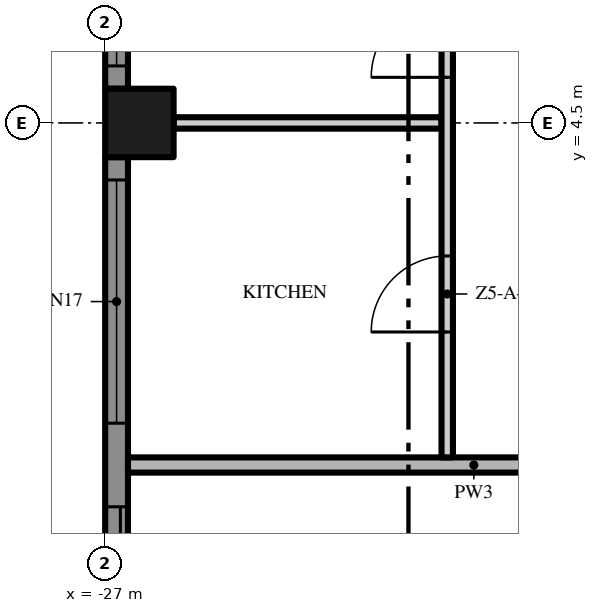
"""IFC4 building model, lengths in metres.
Left out: names, types, materials, properties, quantities, classifications, styles, units other than length and angle.
Written with IfcOpenShell. Run it as: python <this file> out.ifc"""

import sys

from ifc_helpers import new_model, si_unit, direction, frame, frame_2d, origin, origin_2d, place, context, subcontext, project, spatial, polyline, rectangle, outline, extrude, element, fill, save


model = new_model("IFC4")
c1 = context("Model", 3, precision=1e-05, world=origin(), true_north=direction((0.0, 1.0)))
c2 = subcontext(c1, "Body", "Model", "MODEL_VIEW")
j1 = project(units=[si_unit("LENGTHUNIT", "METRE"), si_unit("PLANEANGLEUNIT", "RADIAN")], contexts=[c1])
p1 = place(None, origin())
s1 = spatial("IfcSite", under=j1, at=p1, CompositionType="ELEMENT")
p2 = place(p1, origin())
s2 = spatial("IfcBuilding", under=s1, at=p2, CompositionType="ELEMENT")
p3 = place(p2, frame((0.0, 0.0, 242.6)))
s3 = spatial("IfcBuildingStorey", under=s2, at=p3, CompositionType="ELEMENT", Elevation=242.6)
p4 = place(p3, frame((-26.55, 4.5, 0.0), z_axis=(0.0, 0.0, 1.0), x_axis=(1.0, 0.0, 0.0)))
e1 = element("IfcColumn", 1, at=p4, inside=s3, PredefinedType="COLUMN", context=c2, shape_type="SweptSolid", body=[
    extrude(rectangle(XDim=0.9, YDim=0.9, at=origin_2d()), origin(), (0.0, 0.0, 1.0), 3.5),
])
p5 = place(p3, frame((-26.85, 4.95, 0.0), z_axis=(0.0, 0.0, 1.0), x_axis=(0.0, 1.0, 0.0)))
e2 = element("IfcWall", 2, at=p5, inside=s3, PredefinedType="SOLIDWALL", context=c2, shape_type="SweptSolid", body=[
    extrude(rectangle(XDim=8.1, YDim=0.3, at=frame_2d((4.05, 0.0))), origin(), (0.0, 0.0, 1.0), 3.5),
])
p6 = place(p5, frame((4.6, 0.0, 0.45)))
e3 = element("IfcOpeningElement", 3, at=p6, cuts=e2, PredefinedType="OPENING", context=c2, shape_type="SweptSolid", body=[
    extrude(rectangle(XDim=3.2, YDim=2.65, at=frame_2d((1.6, 1.325))), frame((0.0, 0.16, 0.0), z_axis=(0.0, -1.0, 0.0), x_axis=(1.0, 0.0, 0.0)), (0.0, 0.0, 1.0), 0.32),
])
p7 = place(p5, frame((0.3, 0.0, 0.45)))
e4 = element("IfcOpeningElement", 4, at=p7, cuts=e2, PredefinedType="OPENING", context=c2, shape_type="SweptSolid", body=[
    extrude(rectangle(XDim=3.2, YDim=2.65, at=frame_2d((1.6, 1.325))), frame((0.0, 0.16, 0.0), z_axis=(0.0, -1.0, 0.0), x_axis=(1.0, 0.0, 0.0)), (0.0, 0.0, 1.0), 0.32),
])
p8 = place(p3, frame((-26.85, -4.05, 0.0), z_axis=(0.0, 0.0, 1.0), x_axis=(0.0, 1.0, 0.0)))
e5 = element("IfcWall", 5, at=p8, inside=s3, PredefinedType="SOLIDWALL", context=c2, shape_type="SweptSolid", body=[
    extrude(rectangle(XDim=8.1, YDim=0.3, at=frame_2d((4.05, 0.0))), origin(), (0.0, 0.0, 1.0), 3.5),
])
p9 = place(p8, frame((4.6, 0.0, 0.45)))
e6 = element("IfcOpeningElement", 6, at=p9, cuts=e5, PredefinedType="OPENING", context=c2, shape_type="SweptSolid", body=[
    extrude(rectangle(XDim=3.2, YDim=2.65, at=frame_2d((1.6, 1.325))), frame((0.0, 0.16, 0.0), z_axis=(0.0, -1.0, 0.0), x_axis=(1.0, 0.0, 0.0)), (0.0, 0.0, 1.0), 0.32),
])
p10 = place(p8, frame((0.3, 0.0, 0.0)))
e7 = element("IfcOpeningElement", 7, at=p10, cuts=e5, PredefinedType="OPENING", context=c2, shape_type="SweptSolid", body=[
    extrude(rectangle(XDim=3.2, YDim=2.4, at=frame_2d((1.6, 1.2))), frame((0.0, 0.16, 0.0), z_axis=(0.0, -1.0, 0.0), x_axis=(1.0, 0.0, 0.0)), (0.0, 0.0, 1.0), 0.32),
])
p11 = place(p3, origin())
e8 = element("IfcWall", 8, at=p11, inside=s3, PredefinedType="USERDEFINED", context=c2, shape_type="SweptSolid", body=[
    extrude(outline(polyline([(-28.8, 18.0), (-29.505, 16.5), (-29.941, 15.0), (-30.0, 14.25), (-29.941, 13.5), (-29.505, 12.0), (-28.8, 10.5), (-28.095, 9.0), (-27.659, 7.5), (-27.6, 6.75), (-27.659, 6.0), (-28.095, 4.5), (-28.8, 3.0), (-29.505, 1.5), (-29.941, 0.0), (-30.0, -0.75), (-29.941, -1.5), (-29.505, -3.0), (-28.8, -4.5), (-28.095, -6.0), (-27.659, -7.5), (-27.6, -8.25), (-27.659, -9.0), (-28.095, -10.5), (-28.8, -12.0), (-29.505, -13.5), (-29.941, -15.0), (-30.0, -15.75), (-29.941, -16.5), (-29.505, -18.0), (-29.265, -17.93), (-29.694, -16.455), (-29.749, -15.75), (-29.694, -15.045), (-29.271, -13.589), (-28.574, -12.106), (-27.86, -10.589), (-27.411, -9.045), (-27.349, -8.25), (-27.411, -7.455), (-27.86, -5.911), (-28.574, -4.394), (-29.271, -2.911), (-29.694, -1.455), (-29.749, -0.75), (-29.694, -0.045), (-29.271, 1.411), (-28.574, 2.894), (-27.86, 4.411), (-27.411, 5.955), (-27.349, 6.75), (-27.411, 7.545), (-27.86, 9.089), (-28.574, 10.606), (-29.271, 12.089), (-29.694, 13.545), (-29.749, 14.25), (-29.694, 14.955), (-29.271, 16.411), (-28.574, 17.894), (-28.8, 18.0)])), origin(), (0.0, 0.0, 1.0), 0.9),
])
p12 = place(p3, frame((-26.7, 0.0, 0.0), z_axis=(0.0, 0.0, 1.0), x_axis=(1.0, 0.0, 0.0)))
e9 = element("IfcWall", 9, at=p12, inside=s3, PredefinedType="PARTITIONING", context=c2, shape_type="SweptSolid", body=[
    extrude(rectangle(XDim=9.1, YDim=0.2, at=frame_2d((4.55, 0.0))), origin(), (0.0, 0.0, 1.0), 3.5),
])
p13 = place(p3, frame((-26.1, 4.5, 0.0), z_axis=(0.0, 0.0, 1.0), x_axis=(1.0, 0.0, 0.0)))
e10 = element("IfcWall", 10, at=p13, inside=s3, PredefinedType="PARTITIONING", context=c2, shape_type="SweptSolid", body=[
    extrude(rectangle(XDim=3.525, YDim=0.15, at=frame_2d((1.762, 0.0))), origin(), (0.0, 0.0, 1.0), 3.5),
])
p14 = place(p3, frame((-22.5, 0.1, 0.0), z_axis=(0.0, 0.0, 1.0), x_axis=(0.0, 1.0, 0.0)))
e11 = element("IfcWall", 11, at=p14, inside=s3, PredefinedType="PARTITIONING", context=c2, shape_type="SweptSolid", body=[
    extrude(rectangle(XDim=17.45, YDim=0.15, at=frame_2d((8.725, 0.0))), origin(), (0.0, 0.0, 1.0), 3.5),
])
p15 = place(p14, frame((1.65, 0.0, 0.0)))
e12 = element("IfcOpeningElement", 12, at=p15, cuts=e11, PredefinedType="OPENING", context=c2, shape_type="SweptSolid", body=[
    extrude(rectangle(XDim=1.0, YDim=2.4, at=frame_2d((0.5, 1.2))), frame((0.0, 0.085, 0.0), z_axis=(0.0, -1.0, 0.0), x_axis=(1.0, 0.0, 0.0)), (0.0, 0.0, 1.0), 0.17),
])
p16 = place(p14, frame((5.0, 0.0, 0.0)))
e13 = element("IfcOpeningElement", 13, at=p16, cuts=e11, PredefinedType="OPENING", context=c2, shape_type="SweptSolid", body=[
    extrude(rectangle(XDim=1.0, YDim=2.4, at=frame_2d((0.5, 1.2))), frame((0.0, 0.085, 0.0), z_axis=(0.0, -1.0, 0.0), x_axis=(1.0, 0.0, 0.0)), (0.0, 0.0, 1.0), 0.17),
])
p17 = place(p14, frame((11.4, 0.0, 0.0)))
e14 = element("IfcOpeningElement", 14, at=p17, cuts=e11, PredefinedType="OPENING", context=c2, shape_type="SweptSolid", body=[
    extrude(rectangle(XDim=1.8, YDim=2.4, at=frame_2d((0.9, 1.2))), frame((0.0, 0.085, 0.0), z_axis=(0.0, -1.0, 0.0), x_axis=(1.0, 0.0, 0.0)), (0.0, 0.0, 1.0), 0.17),
])
p18 = place(p7, origin())
e15 = element("IfcWindow", 15, at=p18, inside=s3, PartitioningType="SINGLE_PANEL", PredefinedType="WINDOW", context=c2, shape_type="SweptSolid", body=[
    extrude(rectangle(XDim=3.2, YDim=2.65, at=frame_2d((1.6, 1.325))), frame((0.0, 0.03, 0.0), z_axis=(0.0, -1.0, 0.0), x_axis=(1.0, 0.0, 0.0)), (0.0, 0.0, 1.0), 0.06),
])
fill(e4, e15)
p19 = place(p9, origin())
e16 = element("IfcWindow", 16, at=p19, inside=s3, PartitioningType="SINGLE_PANEL", PredefinedType="WINDOW", context=c2, shape_type="SweptSolid", body=[
    extrude(rectangle(XDim=3.2, YDim=2.65, at=frame_2d((1.6, 1.325))), frame((0.0, 0.03, 0.0), z_axis=(0.0, -1.0, 0.0), x_axis=(1.0, 0.0, 0.0)), (0.0, 0.0, 1.0), 0.06),
])
fill(e6, e16)
p20 = place(p10, origin())
e17 = element("IfcDoor", 17, at=p20, inside=s3, OperationType="SINGLE_SWING_LEFT", PredefinedType="DOOR", context=c2, shape_type="SweptSolid", body=[
    extrude(rectangle(XDim=3.2, YDim=2.4, at=frame_2d((1.6, 1.2))), frame((0.0, 0.025, 0.0), z_axis=(0.0, -1.0, 0.0), x_axis=(1.0, 0.0, 0.0)), (0.0, 0.0, 1.0), 0.05),
])
fill(e7, e17)
p21 = place(p15, origin())
e18 = element("IfcDoor", 18, at=p21, inside=s3, OperationType="SINGLE_SWING_LEFT", PredefinedType="DOOR", context=c2, shape_type="SweptSolid", body=[
    extrude(rectangle(XDim=1.0, YDim=2.4, at=frame_2d((0.5, 1.2))), frame((0.0, 0.025, 0.0), z_axis=(0.0, -1.0, 0.0), x_axis=(1.0, 0.0, 0.0)), (0.0, 0.0, 1.0), 0.05),
])
fill(e12, e18)
p22 = place(p16, origin())
e19 = element("IfcDoor", 19, at=p22, inside=s3, OperationType="SINGLE_SWING_LEFT", PredefinedType="DOOR", context=c2, shape_type="SweptSolid", body=[
    extrude(rectangle(XDim=1.0, YDim=2.4, at=frame_2d((0.5, 1.2))), frame((0.0, 0.025, 0.0), z_axis=(0.0, -1.0, 0.0), x_axis=(1.0, 0.0, 0.0)), (0.0, 0.0, 1.0), 0.05),
])
fill(e13, e19)
save(model, sys.argv[1])
